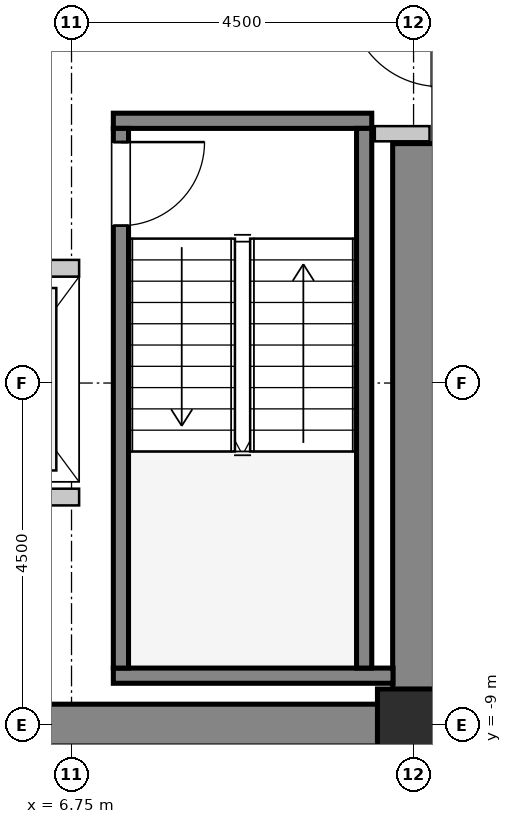
"""IFC4 building model, lengths in metres.
Left out: names, types, materials, properties, quantities, classifications, styles, units other than length and angle.
Written with IfcOpenShell. Run it as: python <this file> out.ifc"""

import sys

from ifc_helpers import new_model, si_unit, direction, frame, frame_2d, origin, origin_2d, place, context, subcontext, project, spatial, rectangle, hollow_rectangle, extrude, source, transform, mapped, element, fill, save


model = new_model("IFC4")
c1 = context("Model", 3, precision=1e-05, world=origin(), true_north=direction((0.0, 1.0)))
c2 = subcontext(c1, "Body", "Model", "MODEL_VIEW")
j1 = project(units=[si_unit("LENGTHUNIT", "METRE"), si_unit("PLANEANGLEUNIT", "RADIAN")], contexts=[c1])
p1 = place(None, origin())
s1 = spatial("IfcSite", under=j1, at=p1, CompositionType="ELEMENT")
p2 = place(p1, origin())
s2 = spatial("IfcBuilding", under=s1, at=p2, CompositionType="ELEMENT")
p3 = place(p2, frame((0.0, 0.0, 164.0)))
s3 = spatial("IfcBuildingStorey", under=s2, at=p3, CompositionType="ELEMENT", Elevation=164.0)
m1 = source(origin(), c2, "Body", "SweptSolid", [
    extrude(rectangle(XDim=9.975, YDim=0.55, at=frame_2d((4.987, 0.0))), origin(), (0.0, 0.0, 1.0), 3.8),
])
p4 = place(p3, frame((1.55, -9.0, 0.0), z_axis=(0.0, 0.0, 1.0), x_axis=(1.0, 0.0, 0.0)))
e1 = element("IfcWall", 1, at=p4, inside=s3, PredefinedType="SHEAR", context=c2, shape_type="MappedRepresentation", body=[
    mapped(m1, transform((0.0, 0.0, 0.0), x_axis=(1.0, 0.0, 0.0), y_axis=(0.0, 1.0, 0.0), z_axis=(0.0, 0.0, 1.0), scale=1.0)),
])
m2 = source(origin(), c2, "Body", "SweptSolid", [
    extrude(rectangle(XDim=7.375, YDim=0.55, at=frame_2d((3.688, 0.0))), origin(), (0.0, 0.0, 1.0), 3.8),
])
p5 = place(p3, frame((11.25, -8.725, 0.0), z_axis=(0.0, 0.0, 1.0), x_axis=(0.0, 1.0, 0.0)))
e2 = element("IfcWall", 2, at=p5, inside=s3, PredefinedType="SHEAR", context=c2, shape_type="MappedRepresentation", body=[
    mapped(m2, transform((0.0, 0.0, 0.0), x_axis=(1.0, 0.0, 0.0), y_axis=(0.0, 1.0, 0.0), z_axis=(0.0, 0.0, 1.0), scale=1.0)),
])
m3 = source(origin(), c2, "Body", "SweptSolid", [
    extrude(hollow_rectangle(XDim=0.95, YDim=0.95, WallThickness=0.045, InnerFilletRadius=0.045, OuterFilletRadius=0.09, at=origin_2d()), origin(), (0.0, 0.0, 1.0), 3.8),
])
p6 = place(p3, frame((11.25, -9.0, 0.0), z_axis=(0.0, 0.0, 1.0), x_axis=(1.0, 0.0, 0.0)))
e3 = element("IfcColumn", 3, at=p6, inside=s3, PredefinedType="COLUMN", context=c2, shape_type="MappedRepresentation", body=[
    mapped(m3, transform((0.0, 0.0, 0.0), x_axis=(1.0, 0.0, 0.0), y_axis=(0.0, 1.0, 0.0), z_axis=(0.0, 0.0, 1.0), scale=1.0)),
])
m4 = source(origin(), c2, "Body", "SweptSolid", [
    extrude(rectangle(XDim=3.4, YDim=0.2, at=frame_2d((1.7, 0.0))), origin(), (0.0, 0.0, 1.0), 3.8),
])
p7 = place(p3, frame((7.3, -1.05, 0.0), z_axis=(0.0, 0.0, 1.0), x_axis=(1.0, 0.0, 0.0)))
e4 = element("IfcWall", 4, at=p7, inside=s3, PredefinedType="SOLIDWALL", context=c2, shape_type="MappedRepresentation", body=[
    mapped(m4, transform((0.0, 0.0, 0.0), x_axis=(1.0, 0.0, 0.0), y_axis=(0.0, 1.0, 0.0), z_axis=(0.0, 0.0, 1.0), scale=1.0)),
])
m5 = source(origin(), c2, "Body", "SweptSolid", [
    extrude(rectangle(XDim=3.68, YDim=0.2, at=frame_2d((1.84, 0.0))), origin(), (0.0, 0.0, 1.0), 3.8),
])
p8 = place(p3, frame((7.3, -8.35, 0.0), z_axis=(0.0, 0.0, 1.0), x_axis=(1.0, 0.0, 0.0)))
e5 = element("IfcWall", 5, at=p8, inside=s3, PredefinedType="SOLIDWALL", context=c2, shape_type="MappedRepresentation", body=[
    mapped(m5, transform((0.0, 0.0, 0.0), x_axis=(1.0, 0.0, 0.0), y_axis=(0.0, 1.0, 0.0), z_axis=(0.0, 0.0, 1.0), scale=1.0)),
])
m6 = source(origin(), c2, "Body", "SweptSolid", [
    extrude(rectangle(XDim=7.1, YDim=0.2, at=frame_2d((3.55, 0.0))), origin(), (0.0, 0.0, 1.0), 3.8),
])
p9 = place(p3, frame((7.4, -1.15, 0.0), z_axis=(0.0, 0.0, 1.0), x_axis=(0.0, -1.0, 0.0)))
e6 = element("IfcWall", 6, at=p9, inside=s3, PredefinedType="SOLIDWALL", context=c2, shape_type="MappedRepresentation", body=[
    mapped(m6, transform((0.0, 0.0, 0.0), x_axis=(1.0, 0.0, 0.0), y_axis=(0.0, 1.0, 0.0), z_axis=(0.0, 0.0, 1.0), scale=1.0)),
])
p10 = place(p9, frame((0.18, 0.0, 0.0)))
e7 = element("IfcOpeningElement", 7, at=p10, cuts=e6, PredefinedType="OPENING", context=c2, shape_type="SweptSolid", body=[
    extrude(rectangle(XDim=1.1, YDim=2.15, at=frame_2d((0.55, 1.075))), frame((0.0, 0.11, 0.0), z_axis=(0.0, -1.0, 0.0), x_axis=(1.0, 0.0, 0.0)), (0.0, 0.0, 1.0), 0.22),
])
p11 = place(p3, frame((10.6, -1.15, 0.0), z_axis=(0.0, 0.0, 1.0), x_axis=(0.0, -1.0, 0.0)))
e8 = element("IfcWall", 8, at=p11, inside=s3, PredefinedType="SOLIDWALL", context=c2, shape_type="MappedRepresentation", body=[
    mapped(m6, transform((0.0, 0.0, 0.0), x_axis=(1.0, 0.0, 0.0), y_axis=(0.0, 1.0, 0.0), z_axis=(0.0, 0.0, 1.0), scale=1.0)),
])
m7 = source(origin(), c2, "Body", "SweptSolid", [
    extrude(rectangle(XDim=2.0, YDim=0.22, at=frame_2d((1.0, 0.0))), origin(), (0.0, 0.0, 1.0), 3.535),
])
p12 = place(p3, frame((6.85, -2.99, 0.0), z_axis=(0.0, 0.0, 1.0), x_axis=(-1.0, 0.0, 0.0)))
e9 = element("IfcWall", 9, at=p12, inside=s3, PredefinedType="SOLIDWALL", context=c2, shape_type="MappedRepresentation", body=[
    mapped(m7, transform((0.0, 0.0, 0.0), x_axis=(1.0, 0.0, 0.0), y_axis=(0.0, 1.0, 0.0), z_axis=(0.0, 0.0, 1.0), scale=1.0)),
])
p13 = place(p12, frame((0.4, 0.0, 0.0)))
e10 = element("IfcOpeningElement", 10, at=p13, cuts=e9, PredefinedType="OPENING", context=c2, shape_type="SweptSolid", body=[
    extrude(rectangle(XDim=1.2, YDim=2.2, at=frame_2d((0.6, 1.1))), frame((0.0, 0.12, 0.0), z_axis=(0.0, -1.0, 0.0), x_axis=(1.0, 0.0, 0.0)), (0.0, 0.0, 1.0), 0.24),
])
m8 = source(origin(), c2, "Body", "SweptSolid", [
    extrude(rectangle(XDim=2.095, YDim=0.22, at=frame_2d((1.048, 0.0))), origin(), (0.0, 0.0, 1.0), 3.535),
])
p14 = place(p3, frame((4.755, -6.0, 0.0), z_axis=(0.0, 0.0, 1.0), x_axis=(1.0, 0.0, 0.0)))
e11 = element("IfcWall", 11, at=p14, inside=s3, PredefinedType="SOLIDWALL", context=c2, shape_type="MappedRepresentation", body=[
    mapped(m8, transform((0.0, 0.0, 0.0), x_axis=(1.0, 0.0, 0.0), y_axis=(0.0, 1.0, 0.0), z_axis=(0.0, 0.0, 1.0), scale=1.0)),
])
m9 = source(origin(), c2, "Body", "SweptSolid", [
    extrude(rectangle(XDim=0.72, YDim=0.2, at=frame_2d((0.36, 0.0))), origin(), (0.0, 0.0, 1.0), 3.535),
])
p15 = place(p3, frame((10.74, -1.22, 0.0), z_axis=(0.0, 0.0, 1.0), x_axis=(1.0, 0.0, 0.0)))
e12 = element("IfcWall", 12, at=p15, inside=s3, PredefinedType="PARTITIONING", context=c2, shape_type="MappedRepresentation", body=[
    mapped(m9, transform((0.0, 0.0, 0.0), x_axis=(1.0, 0.0, 0.0), y_axis=(0.0, 1.0, 0.0), z_axis=(0.0, 0.0, 1.0), scale=1.0)),
])
m10 = source(origin(), c2, "Body", "SweptSolid", [
    extrude(rectangle(XDim=1.1, YDim=2.15, at=frame_2d((0.55, 1.075))), frame((0.0, 0.025, 0.0), z_axis=(0.0, -1.0, 0.0), x_axis=(1.0, 0.0, 0.0)), (0.0, 0.0, 1.0), 0.05),
])
p16 = place(p10, origin())
e13 = element("IfcDoor", 13, at=p16, inside=s3, OperationType="SINGLE_SWING_LEFT", PredefinedType="DOOR", context=c2, shape_type="MappedRepresentation", body=[
    mapped(m10, transform((0.0, 0.0, 0.0), x_axis=(1.0, 0.0, 0.0), y_axis=(0.0, 1.0, 0.0), z_axis=(0.0, 0.0, 1.0), scale=1.0)),
])
fill(e7, e13)
save(model, sys.argv[1])
